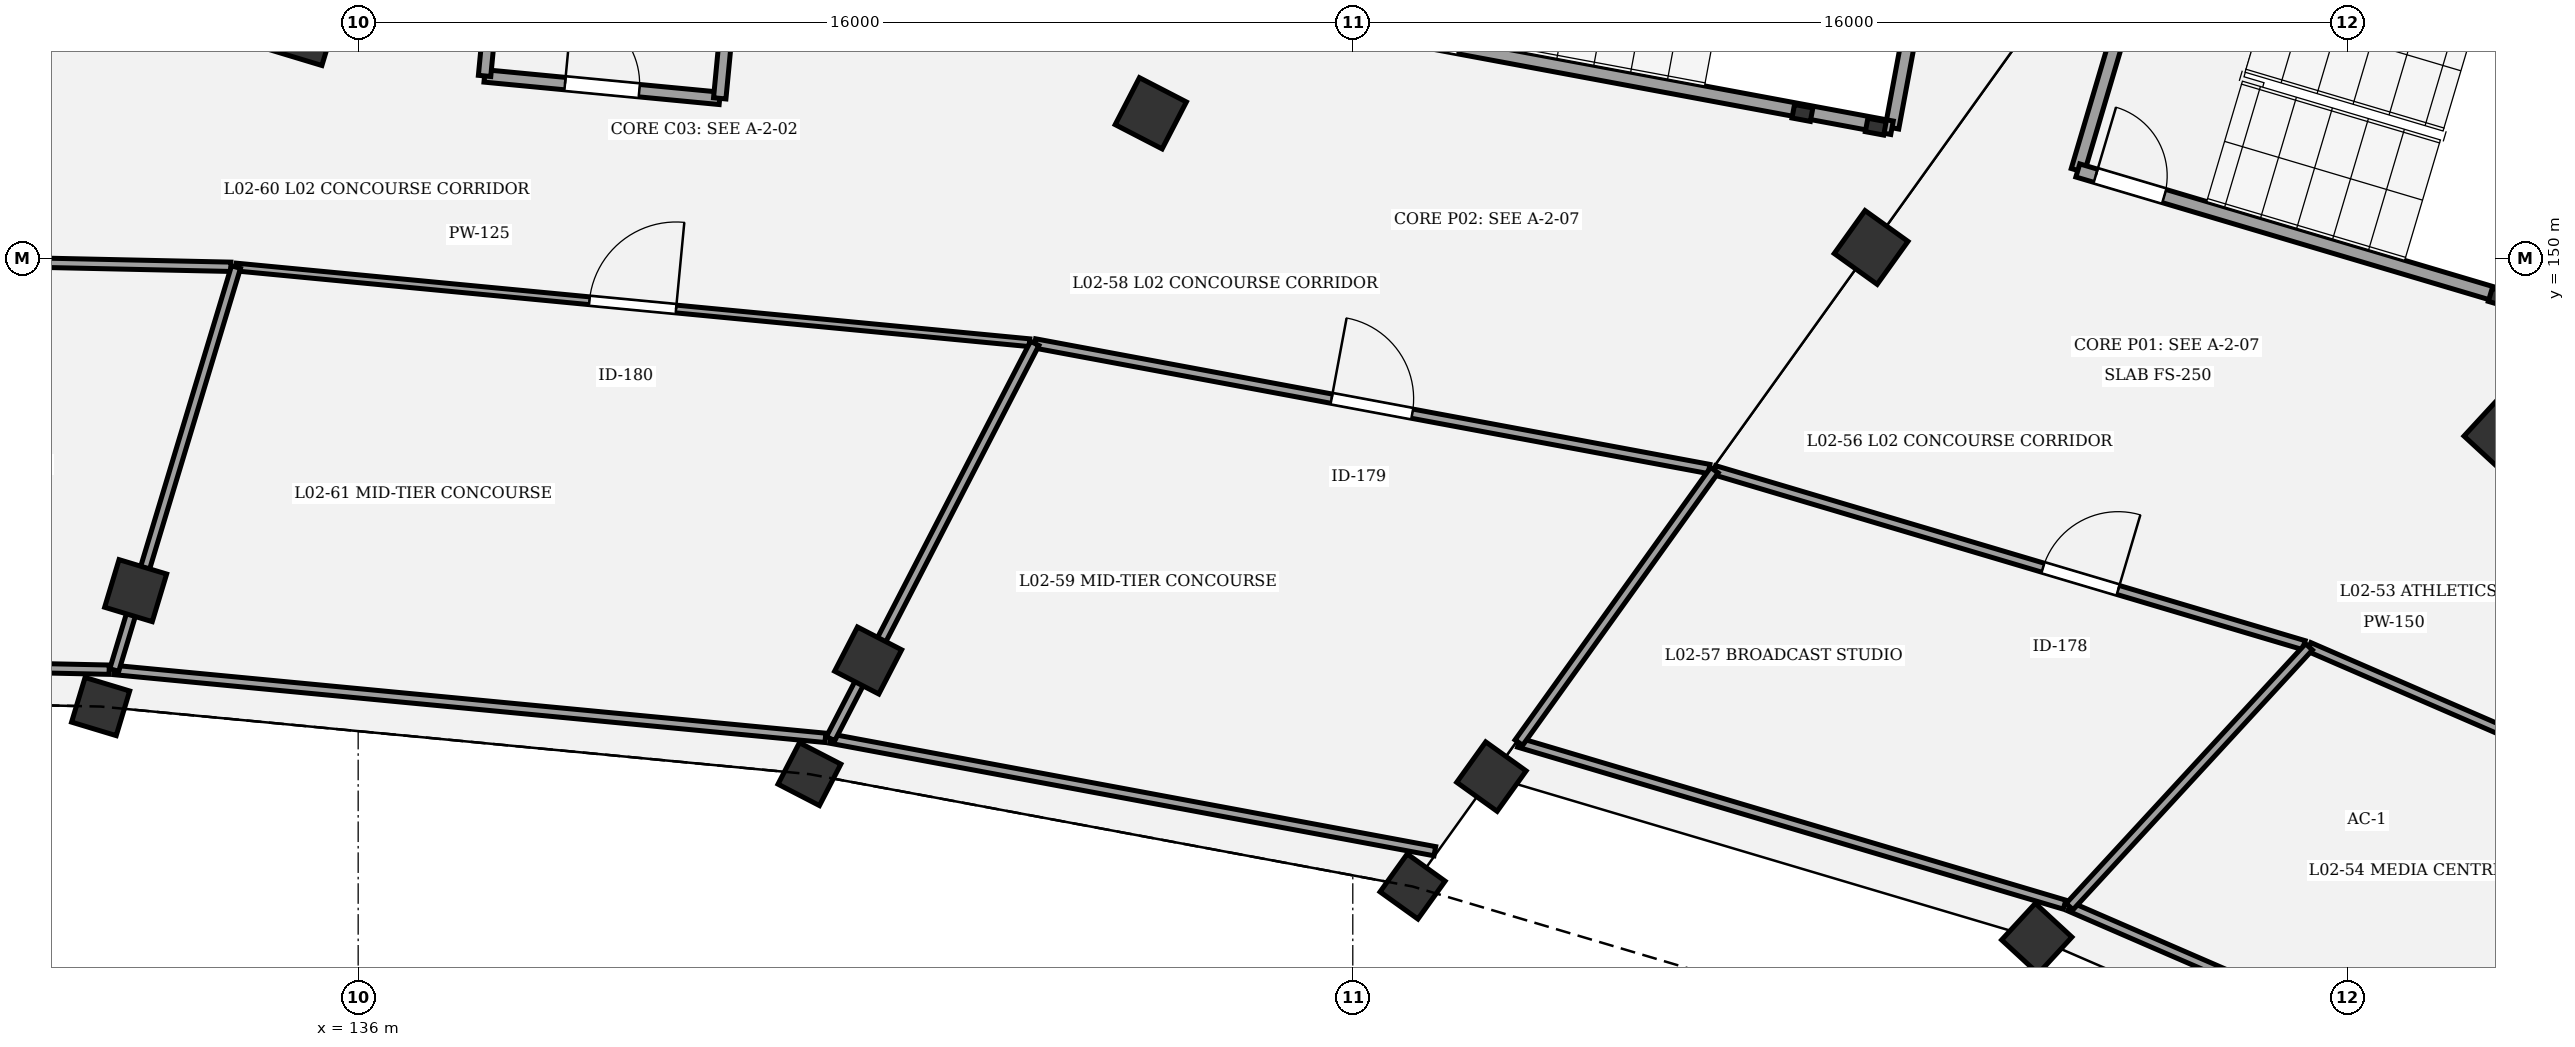
"""IFC4 building model, lengths in metres.
Left out: names, types, materials, properties, quantities, classifications, styles, units other than length and angle.
Written with IfcOpenShell. Run it as: python <this file> out.ifc"""

import sys

from ifc_helpers import new_model, si_unit, direction, frame, frame_2d, origin, origin_2d, place, context, subcontext, project, spatial, rectangle, extrude, element, fill, save


model = new_model("IFC4")
c1 = context("Model", 3, precision=1e-05, world=origin(), true_north=direction((0.0, 1.0)))
c2 = subcontext(c1, "Body", "Model", "MODEL_VIEW")
j1 = project(units=[si_unit("LENGTHUNIT", "METRE"), si_unit("PLANEANGLEUNIT", "RADIAN")], contexts=[c1])
p1 = place(None, origin())
s1 = spatial("IfcSite", under=j1, at=p1, CompositionType="ELEMENT")
p2 = place(p1, origin())
s2 = spatial("IfcBuilding", under=s1, at=p2, CompositionType="ELEMENT")
p3 = place(p2, frame((0.0, 0.0, 10.2)))
s3 = spatial("IfcBuildingStorey", under=s2, at=p3, CompositionType="ELEMENT", Elevation=10.2)
p4 = place(p3, frame((163.003, 139.062, 0.0), z_axis=(0.0, 0.0, 1.0), x_axis=(0.677903094969, 0.735151272753, 0.0)))
e1 = element("IfcColumn", 1, at=p4, inside=s3, PredefinedType="COLUMN", context=c2, shape_type="SweptSolid", body=[
    extrude(rectangle(XDim=0.8, YDim=0.8, at=origin_2d()), origin(), (0.0, 0.0, 1.0), 4.5),
])
p5 = place(p3, frame((170.476, 147.168, 0.0), z_axis=(0.0, 0.0, 1.0), x_axis=(0.677903094969, 0.735151272753, 0.0)))
e2 = element("IfcColumn", 2, at=p5, inside=s3, PredefinedType="COLUMN", context=c2, shape_type="SweptSolid", body=[
    extrude(rectangle(XDim=0.85, YDim=0.85, at=origin_2d()), origin(), (0.0, 0.0, 1.0), 4.5),
])
p6 = place(p3, frame((152.962, 139.899, 0.0), z_axis=(0.0, 0.0, 1.0), x_axis=(0.582974127943, 0.812490717577, 0.0)))
e3 = element("IfcColumn", 3, at=p6, inside=s3, PredefinedType="COLUMN", context=c2, shape_type="SweptSolid", body=[
    extrude(rectangle(XDim=0.75, YDim=0.75, at=origin_2d()), origin(), (0.0, 0.0, 1.0), 4.5),
])
p7 = place(p3, frame((154.23, 141.667, 0.0), z_axis=(0.0, 0.0, 1.0), x_axis=(0.582974127943, 0.812490717577, 0.0)))
e4 = element("IfcColumn", 4, at=p7, inside=s3, PredefinedType="COLUMN", context=c2, shape_type="SweptSolid", body=[
    extrude(rectangle(XDim=0.8, YDim=0.8, at=origin_2d()), origin(), (0.0, 0.0, 1.0), 4.5),
])
p8 = place(p3, frame((160.338, 150.177, 0.0), z_axis=(0.0, 0.0, 1.0), x_axis=(0.582974127943, 0.812490717577, 0.0)))
e5 = element("IfcColumn", 5, at=p8, inside=s3, PredefinedType="COLUMN", context=c2, shape_type="SweptSolid", body=[
    extrude(rectangle(XDim=0.85, YDim=0.85, at=origin_2d()), origin(), (0.0, 0.0, 1.0), 4.5),
])
p9 = place(p3, frame((143.259, 141.706, 0.0), z_axis=(0.0, 0.0, 1.0), x_axis=(0.458959712465, 0.888457079624, 0.0)))
e6 = element("IfcColumn", 6, at=p9, inside=s3, PredefinedType="COLUMN", context=c2, shape_type="SweptSolid", body=[
    extrude(rectangle(XDim=0.75, YDim=0.75, at=origin_2d()), origin(), (0.0, 0.0, 1.0), 4.5),
])
p10 = place(p3, frame((144.204, 143.534, 0.0), z_axis=(0.0, 0.0, 1.0), x_axis=(0.458959712465, 0.888457079624, 0.0)))
e7 = element("IfcColumn", 7, at=p10, inside=s3, PredefinedType="COLUMN", context=c2, shape_type="SweptSolid", body=[
    extrude(rectangle(XDim=0.8, YDim=0.8, at=origin_2d()), origin(), (0.0, 0.0, 1.0), 4.5),
])
p11 = place(p3, frame((148.75, 152.335, 0.0), z_axis=(0.0, 0.0, 1.0), x_axis=(0.458959712465, 0.888457079624, 0.0)))
e8 = element("IfcColumn", 8, at=p11, inside=s3, PredefinedType="COLUMN", context=c2, shape_type="SweptSolid", body=[
    extrude(rectangle(XDim=0.85, YDim=0.85, at=origin_2d()), origin(), (0.0, 0.0, 1.0), 4.5),
])
p12 = place(p3, frame((131.857, 142.793, 0.0), z_axis=(0.0, 0.0, 1.0), x_axis=(0.289198876314, 0.957269037387, 0.0)))
e9 = element("IfcColumn", 9, at=p12, inside=s3, PredefinedType="COLUMN", context=c2, shape_type="SweptSolid", body=[
    extrude(rectangle(XDim=0.75, YDim=0.75, at=origin_2d()), origin(), (0.0, 0.0, 1.0), 4.5),
])
p13 = place(p3, frame((132.42, 144.657, 0.0), z_axis=(0.0, 0.0, 1.0), x_axis=(0.289198876314, 0.957269037387, 0.0)))
e10 = element("IfcColumn", 10, at=p13, inside=s3, PredefinedType="COLUMN", context=c2, shape_type="SweptSolid", body=[
    extrude(rectangle(XDim=0.8, YDim=0.8, at=origin_2d()), origin(), (0.0, 0.0, 1.0), 4.5),
])
p14 = place(p3, frame((135.133, 153.634, 0.0), z_axis=(0.0, 0.0, 1.0), x_axis=(0.289198876314, 0.957269037387, 0.0)))
e11 = element("IfcColumn", 11, at=p14, inside=s3, PredefinedType="COLUMN", context=c2, shape_type="SweptSolid", body=[
    extrude(rectangle(XDim=0.85, YDim=0.85, at=origin_2d()), origin(), (0.0, 0.0, 1.0), 4.5),
])
p15 = place(p3, frame((175.556, 153.205, 0.0), z_axis=(0.0, 0.0, 1.0), x_axis=(-0.95866052287, 0.28455228323, 0.0)))
e12 = element("IfcWall", 12, at=p15, inside=s3, PredefinedType="STANDARD", context=c2, shape_type="SweptSolid", body=[
    extrude(rectangle(XDim=10.821, YDim=0.35, at=frame_2d((5.41, 0.0))), origin(), (0.0, 0.0, 1.0), 3.42),
])
p16 = place(p15, frame((4.86, 0.0, 0.9)))
e13 = element("IfcOpeningElement", 13, at=p16, cuts=e12, PredefinedType="OPENING", context=c2, shape_type="SweptSolid", body=[
    extrude(rectangle(XDim=1.1, YDim=1.95, at=frame_2d((0.55, 0.975))), frame((0.0, 0.185, 0.0), z_axis=(0.0, -1.0, 0.0), x_axis=(1.0, 0.0, 0.0)), (0.0, 0.0, 1.0), 0.37),
])
p17 = place(p3, frame((138.033, 152.937, 0.0), z_axis=(0.0, 0.0, 1.0), x_axis=(0.995481022971, -0.094960691361, 0.0)))
e14 = element("IfcWall", 14, at=p17, inside=s3, PredefinedType="PARTITIONING", context=c2, shape_type="SweptSolid", body=[
    extrude(rectangle(XDim=3.8, YDim=0.2, at=frame_2d((1.9, 0.0))), origin(), (0.0, 0.0, 1.0), 3.35),
])
p18 = place(p17, frame((1.3, 0.0, 0.0)))
e15 = element("IfcOpeningElement", 15, at=p18, cuts=e14, PredefinedType="OPENING", context=c2, shape_type="SweptSolid", body=[
    extrude(rectangle(XDim=1.2, YDim=2.18, at=frame_2d((0.6, 1.09))), frame((0.0, 0.11, 0.0), z_axis=(0.0, -1.0, 0.0), x_axis=(1.0, 0.0, 0.0)), (0.0, 0.0, 1.0), 0.22),
])
for number, where, z_axis, x_axis in (
    (16, (138.033, 152.937, 0.0), (0.0, 0.0, 1.0), (0.095, 0.995, 0.0)),
    (17, (141.816, 152.576, 0.0), (0.0, 0.0, 1.0), (0.095, 0.995, 0.0)),
):
    element("IfcWall", number, at=place(p3, frame(where, z_axis=z_axis, x_axis=x_axis)), inside=s3, PredefinedType="PARTITIONING", context=c2, shape_type="SweptSolid", body=[
        extrude(rectangle(XDim=2.12, YDim=0.2, at=frame_2d((1.06, 0.0))), origin(), (0.0, 0.0, 1.0), 3.35),
    ])
p19 = place(p3, frame((170.442, 149.373, 0.0), z_axis=(0.0, 0.0, 1.0), x_axis=(0.958670893355, -0.284517342588, 0.0)))
e18 = element("IfcColumn", 18, at=p19, inside=s3, PredefinedType="COLUMN", context=c2, shape_type="SweptSolid", body=[
    extrude(rectangle(XDim=0.3, YDim=0.22, at=origin_2d()), origin(), (0.0, 0.0, 1.0), 4.5),
])
p20 = place(p3, frame((164.918, 155.644, 0.0), z_axis=(0.0, 0.0, 1.0), x_axis=(0.958675743706, -0.284500998997, 0.0)))
e19 = element("IfcWall", 19, at=p20, inside=s3, PredefinedType="SHEAR", context=c2, shape_type="SweptSolid", body=[
    extrude(rectangle(XDim=8.54, YDim=0.22, at=frame_2d((4.27, 0.0))), origin(), (0.0, 0.0, 1.0), 4.25),
])
p21 = place(p3, frame((163.663, 151.416, 0.0), z_axis=(0.0, 0.0, 1.0), x_axis=(0.284497328872, 0.958676832861, 0.0)))
e20 = element("IfcWall", 20, at=p21, inside=s3, PredefinedType="SHEAR", context=c2, shape_type="SweptSolid", body=[
    extrude(rectangle(XDim=4.41, YDim=0.22, at=frame_2d((2.205, 0.0))), origin(), (0.0, 0.0, 1.0), 4.25),
])
p22 = place(p3, frame((163.663, 151.416, 0.0), z_axis=(0.0, 0.0, 1.0), x_axis=(0.958665631999, -0.284535069937, 0.0)))
e21 = element("IfcWall", 21, at=p22, inside=s3, PredefinedType="SHEAR", context=c2, shape_type="SweptSolid", body=[
    extrude(rectangle(XDim=8.54, YDim=0.22, at=frame_2d((4.27, 0.0))), origin(), (0.0, 0.0, 1.0), 4.25),
])
p23 = place(p22, frame((0.3, 0.0, 0.0)))
e22 = element("IfcOpeningElement", 22, at=p23, cuts=e21, PredefinedType="OPENING", context=c2, shape_type="SweptSolid", body=[
    extrude(rectangle(XDim=1.15, YDim=2.15, at=frame_2d((0.575, 1.075))), frame((0.0, 0.12, 0.0), z_axis=(0.0, -1.0, 0.0), x_axis=(1.0, 0.0, 0.0)), (0.0, 0.0, 1.0), 0.24),
])
for number, where, z_axis, x_axis in (
    (23, (159.233, 152.34, 0.0), (0.0, 0.0, 1.0), (0.983, -0.183, 0.0)),
    (24, (160.413, 152.121, 0.0), (0.0, 0.0, 1.0), (0.983, -0.183, 0.0)),
):
    element("IfcColumn", number, at=place(p3, frame(where, z_axis=z_axis, x_axis=x_axis)), inside=s3, PredefinedType="COLUMN", context=c2, shape_type="SweptSolid", body=[
        extrude(rectangle(XDim=0.3, YDim=0.22, at=origin_2d()), origin(), (0.0, 0.0, 1.0), 4.5),
    ])
p24 = place(p3, frame((160.674, 152.103, 0.0), z_axis=(0.0, 0.0, 1.0), x_axis=(0.183078394814, 0.983098317236, 0.0)))
e25 = element("IfcWall", 25, at=p24, inside=s3, PredefinedType="SHEAR", context=c2, shape_type="SweptSolid", body=[
    extrude(rectangle(XDim=4.41, YDim=0.22, at=frame_2d((2.205, 0.0))), origin(), (0.0, 0.0, 1.0), 4.25),
])
p25 = place(p3, frame((152.279, 153.666, 0.0), z_axis=(0.0, 0.0, 1.0), x_axis=(0.983097993869, -0.18308013123, 0.0)))
e26 = element("IfcWall", 26, at=p25, inside=s3, PredefinedType="SHEAR", context=c2, shape_type="SweptSolid", body=[
    extrude(rectangle(XDim=8.54, YDim=0.22, at=frame_2d((4.27, 0.0))), origin(), (0.0, 0.0, 1.0), 4.25),
])
p26 = place(p25, frame((0.3, 0.0, 0.0)))
e27 = element("IfcOpeningElement", 27, at=p26, cuts=e26, PredefinedType="OPENING", context=c2, shape_type="SweptSolid", body=[
    extrude(rectangle(XDim=1.15, YDim=2.15, at=frame_2d((0.575, 1.075))), frame((0.0, 0.12, 0.0), z_axis=(0.0, -1.0, 0.0), x_axis=(1.0, 0.0, 0.0)), (0.0, 0.0, 1.0), 0.24),
])
p27 = place(p3, frame((167.382, 143.753, 0.0), z_axis=(0.0, 0.0, 1.0), x_axis=(0.917494590455, -0.397748257677, 0.0)))
e28 = element("IfcWall", 28, at=p27, inside=s3, PredefinedType="PARTITIONING", context=c2, shape_type="SweptSolid", body=[
    extrude(rectangle(XDim=9.049, YDim=0.15, at=frame_2d((4.525, 0.0))), origin(), (0.0, 0.0, 1.0), 3.25),
])
p28 = place(p27, frame((6.104, 0.0, 0.0)))
e29 = element("IfcOpeningElement", 29, at=p28, cuts=e28, PredefinedType="OPENING", context=c2, shape_type="SweptSolid", body=[
    extrude(rectangle(XDim=1.18, YDim=2.3, at=frame_2d((0.59, 1.15))), frame((0.0, 0.085, 0.0), z_axis=(0.0, -1.0, 0.0), x_axis=(1.0, 0.0, 0.0)), (0.0, 0.0, 1.0), 0.17),
])
p29 = place(p3, frame((157.817, 146.596, 0.0), z_axis=(0.0, 0.0, 1.0), x_axis=(0.958655809656, -0.284568161629, 0.0)))
e30 = element("IfcWall", 30, at=p29, inside=s3, PredefinedType="PARTITIONING", context=c2, shape_type="SweptSolid", body=[
    extrude(rectangle(XDim=9.891, YDim=0.15, at=frame_2d((4.946, 0.0))), origin(), (0.0, 0.0, 1.0), 3.25),
])
p30 = place(p29, frame((5.514, 0.0, 0.0)))
e31 = element("IfcOpeningElement", 31, at=p30, cuts=e30, PredefinedType="OPENING", context=c2, shape_type="SweptSolid", body=[
    extrude(rectangle(XDim=1.26, YDim=2.3, at=frame_2d((0.63, 1.15))), frame((0.0, 0.085, 0.0), z_axis=(0.0, -1.0, 0.0), x_axis=(1.0, 0.0, 0.0)), (0.0, 0.0, 1.0), 0.17),
])
p31 = place(p3, frame((146.884, 148.635, 0.0), z_axis=(0.0, 0.0, 1.0), x_axis=(0.983097372707, -0.183083466695, 0.0)))
e32 = element("IfcWall", 32, at=p31, inside=s3, PredefinedType="PARTITIONING", context=c2, shape_type="SweptSolid", body=[
    extrude(rectangle(XDim=11.035, YDim=0.15, at=frame_2d((5.517, 0.0))), origin(), (0.0, 0.0, 1.0), 3.25),
])
p32 = place(p31, frame((4.857, 0.0, 0.0)))
e33 = element("IfcOpeningElement", 33, at=p32, cuts=e32, PredefinedType="OPENING", context=c2, shape_type="SweptSolid", body=[
    extrude(rectangle(XDim=1.32, YDim=2.3, at=frame_2d((0.66, 1.15))), frame((0.0, 0.085, 0.0), z_axis=(0.0, -1.0, 0.0), x_axis=(1.0, 0.0, 0.0)), (0.0, 0.0, 1.0), 0.17),
])
p33 = place(p3, frame((134.035, 149.862, 0.0), z_axis=(0.0, 0.0, 1.0), x_axis=(0.995485111947, -0.094917816515, 0.0)))
e34 = element("IfcWall", 34, at=p33, inside=s3, PredefinedType="PARTITIONING", context=c2, shape_type="SweptSolid", body=[
    extrude(rectangle(XDim=12.822, YDim=0.125, at=frame_2d((6.411, 0.0))), origin(), (0.0, 0.0, 1.0), 3.25),
])
p34 = place(p33, frame((5.711, 0.0, 0.0)))
e35 = element("IfcOpeningElement", 35, at=p34, cuts=e34, PredefinedType="OPENING", context=c2, shape_type="SweptSolid", body=[
    extrude(rectangle(XDim=1.4, YDim=2.3, at=frame_2d((0.7, 1.15))), frame((0.0, 0.073, 0.0), z_axis=(0.0, -1.0, 0.0), x_axis=(1.0, 0.0, 0.0)), (0.0, 0.0, 1.0), 0.145),
])
p35 = place(p3, frame((115.04, 150.274, 0.0), z_axis=(0.0, 0.0, 1.0), x_axis=(0.999768266483, -0.021527037261, 0.0)))
e36 = element("IfcWall", 36, at=p35, inside=s3, PredefinedType="PARTITIONING", context=c2, shape_type="SweptSolid", body=[
    extrude(rectangle(XDim=18.917, YDim=0.15, at=frame_2d((9.458, 0.0))), origin(), (0.0, 0.0, 1.0), 3.25),
])
p36 = place(p35, frame((9.009, 0.0, 0.0)))
e37 = element("IfcOpeningElement", 37, at=p36, cuts=e36, PredefinedType="OPENING", context=c2, shape_type="SweptSolid", body=[
    extrude(rectangle(XDim=0.9, YDim=2.1, at=frame_2d((0.45, 1.05))), frame((0.0, 0.085, 0.0), z_axis=(0.0, -1.0, 0.0), x_axis=(1.0, 0.0, 0.0)), (0.0, 0.0, 1.0), 0.17),
])
p37 = place(p3, frame((171.216, 136.244, 0.0), z_axis=(0.0, 0.0, 1.0), x_axis=(-0.917493946853, 0.397749742286, 0.0)))
e38 = element("IfcWall", 38, at=p37, inside=s3, PredefinedType="PARTITIONING", context=c2, shape_type="SweptSolid", body=[
    extrude(rectangle(XDim=8.377, YDim=0.15, at=frame_2d((4.188, 0.0))), origin(), (0.0, 0.0, 1.0), 3.25),
])
p38 = place(p3, frame((163.53, 139.576, 0.0), z_axis=(0.0, 0.0, 1.0), x_axis=(0.677867773629, 0.735183841958, 0.0)))
e39 = element("IfcWall", 39, at=p38, inside=s3, PredefinedType="PARTITIONING", context=c2, shape_type="SweptSolid", body=[
    extrude(rectangle(XDim=5.682, YDim=0.15, at=frame_2d((2.841, 0.0))), origin(), (0.0, 0.0, 1.0), 3.25),
])
p39 = place(p3, frame((163.45, 139.607, 0.0), z_axis=(0.0, 0.0, 1.0), x_axis=(-0.958661639872, 0.284548520005, 0.0)))
e40 = element("IfcWall", 40, at=p39, inside=s3, PredefinedType="PARTITIONING", context=c2, shape_type="SweptSolid", body=[
    extrude(rectangle(XDim=9.157, YDim=0.15, at=frame_2d((4.579, 0.0))), origin(), (0.0, 0.0, 1.0), 3.25),
])
p40 = place(p3, frame((154.671, 142.212, 0.0), z_axis=(0.0, 0.0, 1.0), x_axis=(0.582996203878, 0.812474877313, 0.0)))
e41 = element("IfcWall", 41, at=p40, inside=s3, PredefinedType="PARTITIONING", context=c2, shape_type="SweptSolid", body=[
    extrude(rectangle(XDim=5.395, YDim=0.15, at=frame_2d((2.698, 0.0))), origin(), (0.0, 0.0, 1.0), 3.25),
])
p41 = place(p3, frame((153.32, 140.467, 0.0), z_axis=(0.0, 0.0, 1.0), x_axis=(-0.98309647403, 0.183088292225, 0.0)))
e42 = element("IfcWall", 42, at=p41, inside=s3, PredefinedType="PARTITIONING", context=c2, shape_type="SweptSolid", body=[
    extrude(rectangle(XDim=9.888, YDim=0.15, at=frame_2d((4.944, 0.0))), origin(), (0.0, 0.0, 1.0), 3.25),
])
p42 = place(p3, frame((143.599, 142.277, 0.0), z_axis=(0.0, 0.0, 1.0), x_axis=(0.458952278776, 0.888460919685, 0.0)))
e43 = element("IfcWall", 43, at=p42, inside=s3, PredefinedType="PARTITIONING", context=c2, shape_type="SweptSolid", body=[
    extrude(rectangle(XDim=7.156, YDim=0.15, at=frame_2d((3.578, 0.0))), origin(), (0.0, 0.0, 1.0), 3.25),
])
p43 = place(p3, frame((143.516, 142.29, 0.0), z_axis=(0.0, 0.0, 1.0), x_axis=(-0.995484580871, 0.094923386203, 0.0)))
e44 = element("IfcWall", 44, at=p43, inside=s3, PredefinedType="PARTITIONING", context=c2, shape_type="SweptSolid", body=[
    extrude(rectangle(XDim=11.492, YDim=0.15, at=frame_2d((5.746, 0.0))), origin(), (0.0, 0.0, 1.0), 3.25),
])
p44 = place(p3, frame((132.076, 143.381, 0.0), z_axis=(0.0, 0.0, 1.0), x_axis=(0.289242753829, 0.95725578053, 0.0)))
e45 = element("IfcWall", 45, at=p44, inside=s3, PredefinedType="PARTITIONING", context=c2, shape_type="SweptSolid", body=[
    extrude(rectangle(XDim=6.771, YDim=0.15, at=frame_2d((3.385, 0.0))), origin(), (0.0, 0.0, 1.0), 3.25),
])
p45 = place(p3, frame((131.995, 143.386, 0.0), z_axis=(0.0, 0.0, 1.0), x_axis=(-0.99976805362, 0.021536920891, 0.0)))
e46 = element("IfcWall", 46, at=p45, inside=s3, PredefinedType="PARTITIONING", context=c2, shape_type="SweptSolid", body=[
    extrude(rectangle(XDim=16.958, YDim=0.15, at=frame_2d((8.479, 0.0))), origin(), (0.0, 0.0, 1.0), 3.25),
])
p46 = place(p18, origin())
e47 = element("IfcDoor", 47, at=p46, inside=s3, OperationType="SINGLE_SWING_LEFT", PredefinedType="DOOR", context=c2, shape_type="SweptSolid", body=[
    extrude(rectangle(XDim=1.2, YDim=2.18, at=frame_2d((0.6, 1.09))), frame((0.0, 0.025, 0.0), z_axis=(0.0, -1.0, 0.0), x_axis=(1.0, 0.0, 0.0)), (0.0, 0.0, 1.0), 0.05),
])
fill(e15, e47)
p47 = place(p23, origin())
e48 = element("IfcDoor", 48, at=p47, inside=s3, OperationType="SINGLE_SWING_LEFT", PredefinedType="DOOR", context=c2, shape_type="SweptSolid", body=[
    extrude(rectangle(XDim=1.15, YDim=2.15, at=frame_2d((0.575, 1.075))), frame((0.0, 0.025, 0.0), z_axis=(0.0, -1.0, 0.0), x_axis=(1.0, 0.0, 0.0)), (0.0, 0.0, 1.0), 0.05),
])
fill(e22, e48)
p48 = place(p30, origin())
e49 = element("IfcDoor", 49, at=p48, inside=s3, OperationType="SINGLE_SWING_RIGHT", PredefinedType="DOOR", context=c2, shape_type="SweptSolid", body=[
    extrude(rectangle(XDim=1.26, YDim=2.3, at=frame_2d((0.63, 1.15))), frame((0.0, 0.025, 0.0), z_axis=(0.0, -1.0, 0.0), x_axis=(1.0, 0.0, 0.0)), (0.0, 0.0, 1.0), 0.05),
])
fill(e31, e49)
p49 = place(p32, origin())
e50 = element("IfcDoor", 50, at=p49, inside=s3, OperationType="SINGLE_SWING_LEFT", PredefinedType="DOOR", context=c2, shape_type="SweptSolid", body=[
    extrude(rectangle(XDim=1.32, YDim=2.3, at=frame_2d((0.66, 1.15))), frame((0.0, 0.025, 0.0), z_axis=(0.0, -1.0, 0.0), x_axis=(1.0, 0.0, 0.0)), (0.0, 0.0, 1.0), 0.05),
])
fill(e33, e50)
p50 = place(p34, origin())
e51 = element("IfcDoor", 51, at=p50, inside=s3, OperationType="SINGLE_SWING_RIGHT", PredefinedType="DOOR", context=c2, shape_type="SweptSolid", body=[
    extrude(rectangle(XDim=1.4, YDim=2.3, at=frame_2d((0.7, 1.15))), frame((0.0, 0.025, 0.0), z_axis=(0.0, -1.0, 0.0), x_axis=(1.0, 0.0, 0.0)), (0.0, 0.0, 1.0), 0.05),
])
fill(e35, e51)
save(model, sys.argv[1])
